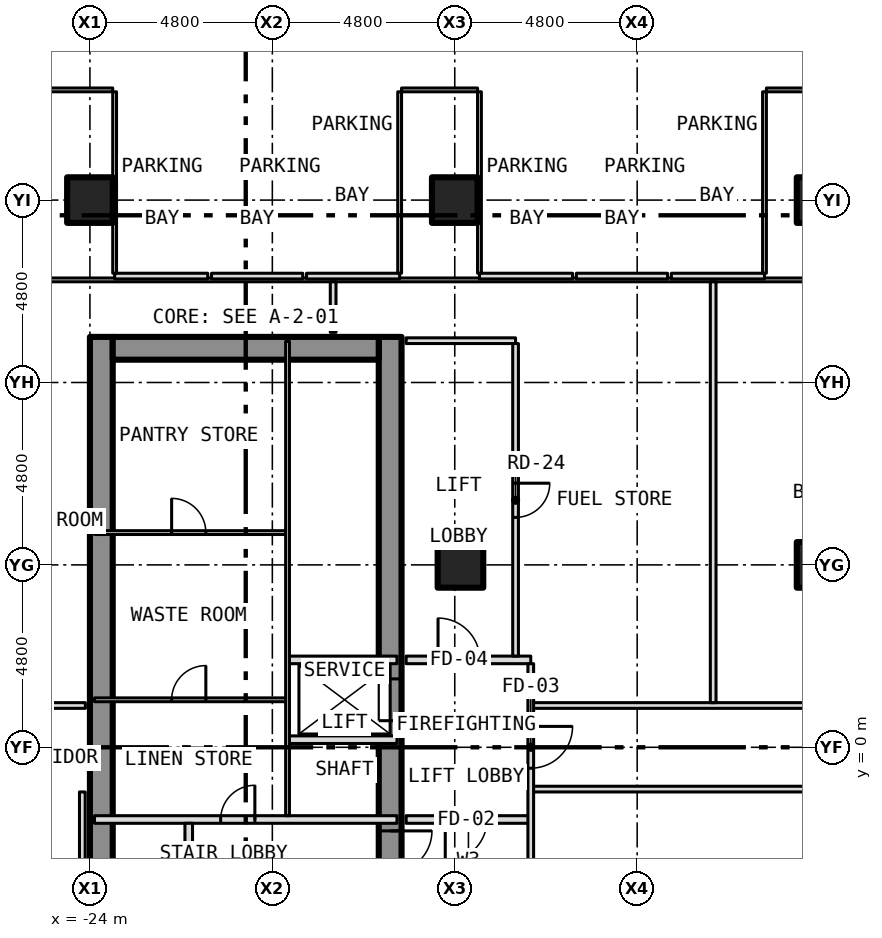
"""IFC4 building model, lengths in metres.
Left out: names, types, materials, properties, quantities, classifications, styles, units other than length and angle.
Written with IfcOpenShell. Run it as: python <this file> out.ifc"""

import sys

from ifc_helpers import new_model, si_unit, direction, frame, frame_2d, origin, origin_2d, place, context, subcontext, project, spatial, rectangle, hollow_rectangle, extrude, element, fill, save


model = new_model("IFC4")
c1 = context("Model", 3, precision=1e-05, world=origin(), true_north=direction((0.0, 1.0)))
c2 = subcontext(c1, "Body", "Model", "MODEL_VIEW")
j1 = project(units=[si_unit("LENGTHUNIT", "METRE"), si_unit("PLANEANGLEUNIT", "RADIAN")], contexts=[c1])
p1 = place(None, origin())
s1 = spatial("IfcSite", under=j1, at=p1, CompositionType="ELEMENT")
p2 = place(p1, origin())
s2 = spatial("IfcBuilding", under=s1, at=p2, CompositionType="ELEMENT")
p3 = place(p2, frame((0.0, 0.0, -10.0)))
s3 = spatial("IfcBuildingStorey", under=s2, at=p3, CompositionType="ELEMENT", Elevation=-10.0)
for number, where, z_axis, x_axis in (
    (1, (-24.0, 14.4, -0.6), (0.0, 0.0, 1.0), (1.0, 0.0, 0.0)),
    (2, (-14.25, 4.8, -0.6), (0.0, 0.0, 1.0), (1.0, 0.0, 0.0)),
    (3, (-14.4, 14.4, -0.6), (0.0, 0.0, 1.0), (1.0, 0.0, 0.0)),
    (4, (-4.8, 4.8, -0.6), (0.0, 0.0, 1.0), (1.0, 0.0, 0.0)),
    (5, (-4.8, 14.4, -0.6), (0.0, 0.0, 1.0), (1.0, 0.0, 0.0)),
):
    element("IfcColumn", number, at=place(p3, frame(where, z_axis=z_axis, x_axis=x_axis)), inside=s3, PredefinedType="COLUMN", context=c2, shape_type="SweptSolid", body=[
        extrude(hollow_rectangle(XDim=1.2, YDim=1.2, WallThickness=0.07, at=origin_2d()), origin(), (0.0, 0.0, 1.0), 5.3),
    ])
p4 = place(p3, frame((-16.1, -10.8, 0.0), z_axis=(0.0, 0.0, 1.0), x_axis=(0.0, 1.0, 0.0)))
e6 = element("IfcWall", 6, at=p4, inside=s3, PredefinedType="SHEAR", context=c2, shape_type="SweptSolid", body=[
    extrude(rectangle(XDim=21.6, YDim=0.6, at=frame_2d((10.8, 0.0))), origin(), (0.0, 0.0, 1.0), 4.7),
])
p5 = place(p4, frame((11.5, 0.0, 0.0)))
e7 = element("IfcOpeningElement", 7, at=p5, cuts=e6, PredefinedType="OPENING", context=c2, shape_type="SweptSolid", body=[
    extrude(rectangle(XDim=1.1, YDim=2.1, at=frame_2d((0.55, 1.05))), frame((0.0, 0.312, 0.0), z_axis=(0.0, -1.0, 0.0), x_axis=(1.0, 0.0, 0.0)), (0.0, 0.0, 1.0), 0.624),
])
p6 = place(p4, frame((0.758, 0.0, 0.0)))
e8 = element("IfcOpeningElement", 8, at=p6, cuts=e6, PredefinedType="OPENING", context=c2, shape_type="SweptSolid", body=[
    extrude(rectangle(XDim=1.1, YDim=2.1, at=frame_2d((0.55, 1.05))), frame((0.0, 0.312, 0.0), z_axis=(0.0, -1.0, 0.0), x_axis=(1.0, 0.0, 0.0)), (0.0, 0.0, 1.0), 0.624),
])
p7 = place(p4, frame((7.5, 0.0, 0.0)))
e9 = element("IfcOpeningElement", 9, at=p7, cuts=e6, PredefinedType="OPENING", context=c2, shape_type="SweptSolid", body=[
    extrude(rectangle(XDim=1.1, YDim=2.1, at=frame_2d((0.55, 1.05))), frame((0.0, 0.312, 0.0), z_axis=(0.0, -1.0, 0.0), x_axis=(1.0, 0.0, 0.0)), (0.0, 0.0, 1.0), 0.624),
])
p8 = place(p3, frame((-23.7, -10.8, 0.0), z_axis=(0.0, 0.0, 1.0), x_axis=(0.0, 1.0, 0.0)))
e10 = element("IfcWall", 10, at=p8, inside=s3, PredefinedType="SHEAR", context=c2, shape_type="SweptSolid", body=[
    extrude(rectangle(XDim=21.6, YDim=0.6, at=frame_2d((10.8, 0.0))), origin(), (0.0, 0.0, 1.0), 4.7),
])
p9 = place(p3, frame((-23.4, 10.5, 0.0), z_axis=(0.0, 0.0, 1.0), x_axis=(1.0, 0.0, 0.0)))
e11 = element("IfcWall", 11, at=p9, inside=s3, PredefinedType="SHEAR", context=c2, shape_type="SweptSolid", body=[
    extrude(rectangle(XDim=7.0, YDim=0.6, at=frame_2d((3.5, 0.0))), origin(), (0.0, 0.0, 1.0), 4.7),
])
p10 = place(p3, frame((-23.88, -1.9, 0.0), z_axis=(0.0, 0.0, 1.0), x_axis=(1.0, 0.0, 0.0)))
e12 = element("IfcWall", 12, at=p10, inside=s3, PredefinedType="PARTITIONING", context=c2, shape_type="SweptSolid", body=[
    extrude(rectangle(XDim=7.96, YDim=0.2, at=frame_2d((3.98, 0.0))), origin(), (0.0, 0.0, 1.0), 4.7),
])
p11 = place(p10, frame((3.32, 0.0, 0.0)))
e13 = element("IfcOpeningElement", 13, at=p11, cuts=e12, PredefinedType="OPENING", context=c2, shape_type="SweptSolid", body=[
    extrude(rectangle(XDim=0.9, YDim=2.1, at=frame_2d((0.45, 1.05))), frame((0.0, 0.112, 0.0), z_axis=(0.0, -1.0, 0.0), x_axis=(1.0, 0.0, 0.0)), (0.0, 0.0, 1.0), 0.224),
])
p12 = place(p3, frame((-15.68, -1.9, 0.0), z_axis=(0.0, 0.0, 1.0), x_axis=(1.0, 0.0, 0.0)))
e14 = element("IfcWall", 14, at=p12, inside=s3, PredefinedType="PARTITIONING", context=c2, shape_type="SweptSolid", body=[
    extrude(rectangle(XDim=3.28, YDim=0.2, at=frame_2d((1.64, 0.0))), origin(), (0.0, 0.0, 1.0), 4.7),
])
p13 = place(p12, frame((1.03, 0.0, 0.0)))
e15 = element("IfcOpeningElement", 15, at=p13, cuts=e14, PredefinedType="OPENING", context=c2, shape_type="SweptSolid", body=[
    extrude(rectangle(XDim=1.1, YDim=2.1, at=frame_2d((0.55, 1.05))), frame((0.0, 0.112, 0.0), z_axis=(0.0, -1.0, 0.0), x_axis=(1.0, 0.0, 0.0)), (0.0, 0.0, 1.0), 0.224),
])
p14 = place(p3, frame((-12.4, -1.1, 0.0), z_axis=(0.0, 0.0, 1.0), x_axis=(1.0, 0.0, 0.0)))
e16 = element("IfcWall", 16, at=p14, inside=s3, PredefinedType="PARTITIONING", context=c2, shape_type="SweptSolid", body=[
    extrude(rectangle(XDim=24.8, YDim=0.15, at=frame_2d((12.4, 0.0))), origin(), (0.0, 0.0, 1.0), 4.7),
])
p15 = place(p3, frame((-18.8, 0.2, 0.0), z_axis=(0.0, 0.0, 1.0), x_axis=(1.0, 0.0, 0.0)))
e17 = element("IfcWall", 17, at=p15, inside=s3, PredefinedType="PARTITIONING", context=c2, shape_type="SweptSolid", body=[
    extrude(rectangle(XDim=2.88, YDim=0.2, at=frame_2d((1.44, 0.0))), origin(), (0.0, 0.0, 1.0), 4.7),
])
p16 = place(p3, frame((-37.6, 1.1, 0.0), z_axis=(0.0, 0.0, 1.0), x_axis=(1.0, 0.0, 0.0)))
e18 = element("IfcWall", 18, at=p16, inside=s3, PredefinedType="PARTITIONING", context=c2, shape_type="SweptSolid", body=[
    extrude(rectangle(XDim=13.48, YDim=0.15, at=frame_2d((6.74, 0.0))), origin(), (0.0, 0.0, 1.0), 4.7),
])
p17 = place(p16, frame((4.55, 0.0, 0.0)))
e19 = element("IfcOpeningElement", 19, at=p17, cuts=e18, PredefinedType="OPENING", context=c2, shape_type="SweptSolid", body=[
    extrude(rectangle(XDim=0.9, YDim=2.1, at=frame_2d((0.45, 1.05))), frame((0.0, 0.087, 0.0), z_axis=(0.0, -1.0, 0.0), x_axis=(1.0, 0.0, 0.0)), (0.0, 0.0, 1.0), 0.174),
])
p18 = place(p16, frame((11.35, 0.0, 0.0)))
e20 = element("IfcOpeningElement", 20, at=p18, cuts=e18, PredefinedType="OPENING", context=c2, shape_type="SweptSolid", body=[
    extrude(rectangle(XDim=0.9, YDim=2.1, at=frame_2d((0.45, 1.05))), frame((0.0, 0.087, 0.0), z_axis=(0.0, -1.0, 0.0), x_axis=(1.0, 0.0, 0.0)), (0.0, 0.0, 1.0), 0.174),
])
p19 = place(p3, frame((-12.4, 1.1, 0.0), z_axis=(0.0, 0.0, 1.0), x_axis=(1.0, 0.0, 0.0)))
e21 = element("IfcWall", 21, at=p19, inside=s3, PredefinedType="PARTITIONING", context=c2, shape_type="SweptSolid", body=[
    extrude(rectangle(XDim=24.8, YDim=0.15, at=frame_2d((12.4, 0.0))), origin(), (0.0, 0.0, 1.0), 4.7),
])
p20 = place(p19, frame((9.35, 0.0, 0.0)))
e22 = element("IfcOpeningElement", 22, at=p20, cuts=e21, PredefinedType="OPENING", context=c2, shape_type="SweptSolid", body=[
    extrude(rectangle(XDim=0.9, YDim=2.1, at=frame_2d((0.45, 1.05))), frame((0.0, 0.087, 0.0), z_axis=(0.0, -1.0, 0.0), x_axis=(1.0, 0.0, 0.0)), (0.0, 0.0, 1.0), 0.174),
])
p21 = place(p19, frame((19.35, 0.0, 0.0)))
e23 = element("IfcOpeningElement", 23, at=p21, cuts=e21, PredefinedType="OPENING", context=c2, shape_type="SweptSolid", body=[
    extrude(rectangle(XDim=0.9, YDim=2.1, at=frame_2d((0.45, 1.05))), frame((0.0, 0.087, 0.0), z_axis=(0.0, -1.0, 0.0), x_axis=(1.0, 0.0, 0.0)), (0.0, 0.0, 1.0), 0.174),
])
p22 = place(p3, frame((-23.88, 1.25, 0.0), z_axis=(0.0, 0.0, 1.0), x_axis=(1.0, 0.0, 0.0)))
e24 = element("IfcWall", 24, at=p22, inside=s3, PredefinedType="PARTITIONING", context=c2, shape_type="SweptSolid", body=[
    extrude(rectangle(XDim=5.08, YDim=0.1, at=frame_2d((2.54, 0.0))), origin(), (0.0, 0.0, 1.0), 4.7),
])
p23 = place(p22, frame((2.03, 0.0, 0.0)))
e25 = element("IfcOpeningElement", 25, at=p23, cuts=e24, PredefinedType="OPENING", context=c2, shape_type="SweptSolid", body=[
    extrude(rectangle(XDim=0.9, YDim=2.1, at=frame_2d((0.45, 1.05))), frame((0.0, 0.062, 0.0), z_axis=(0.0, -1.0, 0.0), x_axis=(1.0, 0.0, 0.0)), (0.0, 0.0, 1.0), 0.124),
])
p24 = place(p3, frame((-18.8, 2.3, 0.0), z_axis=(0.0, 0.0, 1.0), x_axis=(1.0, 0.0, 0.0)))
e26 = element("IfcWall", 26, at=p24, inside=s3, PredefinedType="PARTITIONING", context=c2, shape_type="SweptSolid", body=[
    extrude(rectangle(XDim=2.88, YDim=0.2, at=frame_2d((1.44, 0.0))), origin(), (0.0, 0.0, 1.0), 4.7),
])
p25 = place(p3, frame((-15.68, 2.3, 0.0), z_axis=(0.0, 0.0, 1.0), x_axis=(1.0, 0.0, 0.0)))
e27 = element("IfcWall", 27, at=p25, inside=s3, PredefinedType="PARTITIONING", context=c2, shape_type="SweptSolid", body=[
    extrude(rectangle(XDim=3.28, YDim=0.2, at=frame_2d((1.64, 0.0))), origin(), (0.0, 0.0, 1.0), 4.7),
])
p26 = place(p25, frame((0.84, 0.0, 0.0)))
e28 = element("IfcOpeningElement", 28, at=p26, cuts=e27, PredefinedType="OPENING", context=c2, shape_type="SweptSolid", body=[
    extrude(rectangle(XDim=1.1, YDim=2.1, at=frame_2d((0.55, 1.05))), frame((0.0, 0.112, 0.0), z_axis=(0.0, -1.0, 0.0), x_axis=(1.0, 0.0, 0.0)), (0.0, 0.0, 1.0), 0.224),
])
p27 = place(p3, frame((-23.88, 5.65, 0.0), z_axis=(0.0, 0.0, 1.0), x_axis=(1.0, 0.0, 0.0)))
e29 = element("IfcWall", 29, at=p27, inside=s3, PredefinedType="PARTITIONING", context=c2, shape_type="SweptSolid", body=[
    extrude(rectangle(XDim=5.08, YDim=0.1, at=frame_2d((2.54, 0.0))), origin(), (0.0, 0.0, 1.0), 4.7),
])
p28 = place(p27, frame((2.03, 0.0, 0.0)))
e30 = element("IfcOpeningElement", 30, at=p28, cuts=e29, PredefinedType="OPENING", context=c2, shape_type="SweptSolid", body=[
    extrude(rectangle(XDim=0.9, YDim=2.1, at=frame_2d((0.45, 1.05))), frame((0.0, 0.062, 0.0), z_axis=(0.0, -1.0, 0.0), x_axis=(1.0, 0.0, 0.0)), (0.0, 0.0, 1.0), 0.124),
])
p29 = place(p3, frame((-15.68, 10.7, 0.0), z_axis=(0.0, 0.0, 1.0), x_axis=(1.0, 0.0, 0.0)))
e31 = element("IfcWall", 31, at=p29, inside=s3, PredefinedType="PARTITIONING", context=c2, shape_type="SweptSolid", body=[
    extrude(rectangle(XDim=2.88, YDim=0.15, at=frame_2d((1.44, 0.0))), origin(), (0.0, 0.0, 1.0), 4.7),
])
p30 = place(p3, frame((-37.6, 12.3, 0.0), z_axis=(0.0, 0.0, 1.0), x_axis=(1.0, 0.0, 0.0)))
e32 = element("IfcWall", 32, at=p30, inside=s3, PredefinedType="PARTITIONING", context=c2, shape_type="SweptSolid", body=[
    extrude(rectangle(XDim=70.0, YDim=0.1, at=frame_2d((35.0, 0.0))), origin(), (0.0, 0.0, 1.0), 4.7),
])
p31 = place(p3, frame((-23.35, 12.4, 0.0), z_axis=(0.0, 0.0, 1.0), x_axis=(1.0, 0.0, 0.0)))
e33 = element("IfcWall", 33, at=p31, inside=s3, PredefinedType="PARTITIONING", context=c2, shape_type="SweptSolid", body=[
    extrude(rectangle(XDim=2.45, YDim=0.15, at=frame_2d((1.225, 0.0))), origin(), (0.0, 0.0, 1.0), 4.7),
])
p32 = place(p3, frame((-20.8, 12.4, 0.0), z_axis=(0.0, 0.0, 1.0), x_axis=(1.0, 0.0, 0.0)))
e34 = element("IfcWall", 34, at=p32, inside=s3, PredefinedType="PARTITIONING", context=c2, shape_type="SweptSolid", body=[
    extrude(rectangle(XDim=2.4, YDim=0.15, at=frame_2d((1.2, 0.0))), origin(), (0.0, 0.0, 1.0), 4.7),
])
for number, where, z_axis, x_axis in (
    (35, (-18.3, 12.4, 0.0), (0.0, 0.0, 1.0), (1.0, 0.0, 0.0)),
    (36, (-13.75, 12.4, 0.0), (0.0, 0.0, 1.0), (1.0, 0.0, 0.0)),
):
    element("IfcWall", number, at=place(p3, frame(where, z_axis=z_axis, x_axis=x_axis)), inside=s3, PredefinedType="PARTITIONING", context=c2, shape_type="SweptSolid", body=[
        extrude(rectangle(XDim=2.45, YDim=0.15, at=frame_2d((1.225, 0.0))), origin(), (0.0, 0.0, 1.0), 4.7),
    ])
p33 = place(p3, frame((-11.2, 12.4, 0.0), z_axis=(0.0, 0.0, 1.0), x_axis=(1.0, 0.0, 0.0)))
e37 = element("IfcWall", 37, at=p33, inside=s3, PredefinedType="PARTITIONING", context=c2, shape_type="SweptSolid", body=[
    extrude(rectangle(XDim=2.4, YDim=0.15, at=frame_2d((1.2, 0.0))), origin(), (0.0, 0.0, 1.0), 4.7),
])
p34 = place(p3, frame((-8.7, 12.4, 0.0), z_axis=(0.0, 0.0, 1.0), x_axis=(1.0, 0.0, 0.0)))
e38 = element("IfcWall", 38, at=p34, inside=s3, PredefinedType="PARTITIONING", context=c2, shape_type="SweptSolid", body=[
    extrude(rectangle(XDim=2.45, YDim=0.15, at=frame_2d((1.225, 0.0))), origin(), (0.0, 0.0, 1.0), 4.7),
])
for number, where, z_axis, x_axis in (
    (39, (-25.4, 17.3, 0.0), (0.0, 0.0, 1.0), (1.0, 0.0, 0.0)),
    (40, (-15.8, 17.3, 0.0), (0.0, 0.0, 1.0), (1.0, 0.0, 0.0)),
    (41, (-6.2, 17.3, 0.0), (0.0, 0.0, 1.0), (1.0, 0.0, 0.0)),
):
    element("IfcWall", number, at=place(p3, frame(where, z_axis=z_axis, x_axis=x_axis)), inside=s3, PredefinedType="PARTITIONING", context=c2, shape_type="SweptSolid", body=[
        extrude(rectangle(XDim=2.0, YDim=0.1, at=frame_2d((1.0, 0.0))), origin(), (0.0, 0.0, 1.0), 4.7),
    ])
p35 = place(p3, frame((-24.2, -10.725, 0.0), z_axis=(0.0, 0.0, 1.0), x_axis=(0.0, 1.0, 0.0)))
e42 = element("IfcWall", 42, at=p35, inside=s3, PredefinedType="PARTITIONING", context=c2, shape_type="SweptSolid", body=[
    extrude(rectangle(XDim=9.55, YDim=0.15, at=frame_2d((4.775, 0.0))), origin(), (0.0, 0.0, 1.0), 4.7),
])
p36 = place(p3, frame((-23.35, 12.475, 0.0), z_axis=(0.0, 0.0, 1.0), x_axis=(0.0, 1.0, 0.0)))
e43 = element("IfcWall", 43, at=p36, inside=s3, PredefinedType="PARTITIONING", context=c2, shape_type="SweptSolid", body=[
    extrude(rectangle(XDim=4.775, YDim=0.1, at=frame_2d((2.387, 0.0))), origin(), (0.0, 0.0, 1.0), 4.7),
])
p37 = place(p3, frame((-21.4, -10.68, 0.0), z_axis=(0.0, 0.0, 1.0), x_axis=(0.0, 1.0, 0.0)))
e44 = element("IfcWall", 44, at=p37, inside=s3, PredefinedType="PARTITIONING", context=c2, shape_type="SweptSolid", body=[
    extrude(rectangle(XDim=8.68, YDim=0.2, at=frame_2d((4.34, 0.0))), origin(), (0.0, 0.0, 1.0), 4.7),
])
p38 = place(p37, frame((2.1, 0.0, 0.0)))
e45 = element("IfcOpeningElement", 45, at=p38, cuts=e44, PredefinedType="OPENING", context=c2, shape_type="SweptSolid", body=[
    extrude(rectangle(XDim=0.9, YDim=2.1, at=frame_2d((0.45, 1.05))), frame((0.0, 0.112, 0.0), z_axis=(0.0, -1.0, 0.0), x_axis=(1.0, 0.0, 0.0)), (0.0, 0.0, 1.0), 0.224),
])
p39 = place(p37, frame((6.55, 0.0, 0.0)))
e46 = element("IfcOpeningElement", 46, at=p39, cuts=e44, PredefinedType="OPENING", context=c2, shape_type="SweptSolid", body=[
    extrude(rectangle(XDim=0.9, YDim=2.1, at=frame_2d((0.45, 1.05))), frame((0.0, 0.112, 0.0), z_axis=(0.0, -1.0, 0.0), x_axis=(1.0, 0.0, 0.0)), (0.0, 0.0, 1.0), 0.224),
])
p40 = place(p3, frame((-18.8, -1.8, 0.0), z_axis=(0.0, 0.0, 1.0), x_axis=(0.0, 1.0, 0.0)))
e47 = element("IfcWall", 47, at=p40, inside=s3, PredefinedType="PARTITIONING", context=c2, shape_type="SweptSolid", body=[
    extrude(rectangle(XDim=12.48, YDim=0.1, at=frame_2d((6.24, 0.0))), origin(), (0.0, 0.0, 1.0), 4.7),
])
p41 = place(p3, frame((-17.6, 10.92, 0.0), z_axis=(0.0, 0.0, 1.0), x_axis=(0.0, 1.0, 0.0)))
e48 = element("IfcWall", 48, at=p41, inside=s3, PredefinedType="PARTITIONING", context=c2, shape_type="SweptSolid", body=[
    extrude(rectangle(XDim=1.33, YDim=0.15, at=frame_2d((0.665, 0.0))), origin(), (0.0, 0.0, 1.0), 4.7),
])
for number, where, z_axis, x_axis in (
    (49, (-15.85, 12.475, 0.0), (0.0, 0.0, 1.0), (0.0, 1.0, 0.0)),
    (50, (-13.75, 12.475, 0.0), (0.0, 0.0, 1.0), (0.0, 1.0, 0.0)),
):
    element("IfcWall", number, at=place(p3, frame(where, z_axis=z_axis, x_axis=x_axis)), inside=s3, PredefinedType="PARTITIONING", context=c2, shape_type="SweptSolid", body=[
        extrude(rectangle(XDim=4.775, YDim=0.1, at=frame_2d((2.387, 0.0))), origin(), (0.0, 0.0, 1.0), 4.7),
    ])
p42 = place(p3, frame((-12.8, 2.4, 0.0), z_axis=(0.0, 0.0, 1.0), x_axis=(0.0, 1.0, 0.0)))
e51 = element("IfcWall", 51, at=p42, inside=s3, PredefinedType="PARTITIONING", context=c2, shape_type="SweptSolid", body=[
    extrude(rectangle(XDim=8.225, YDim=0.15, at=frame_2d((4.113, 0.0))), origin(), (0.0, 0.0, 1.0), 4.7),
])
p43 = place(p42, frame((3.65, 0.0, 0.0)))
e52 = element("IfcOpeningElement", 52, at=p43, cuts=e51, PredefinedType="OPENING", context=c2, shape_type="SweptSolid", body=[
    extrude(rectangle(XDim=0.9, YDim=2.1, at=frame_2d((0.45, 1.05))), frame((0.0, 0.087, 0.0), z_axis=(0.0, -1.0, 0.0), x_axis=(1.0, 0.0, 0.0)), (0.0, 0.0, 1.0), 0.174),
])
p44 = place(p3, frame((-12.4, -10.725, 0.0), z_axis=(0.0, 0.0, 1.0), x_axis=(0.0, 1.0, 0.0)))
e53 = element("IfcWall", 53, at=p44, inside=s3, PredefinedType="PARTITIONING", context=c2, shape_type="SweptSolid", body=[
    extrude(rectangle(XDim=12.925, YDim=0.15, at=frame_2d((6.462, 0.0))), origin(), (0.0, 0.0, 1.0), 4.7),
])
p45 = place(p44, frame((10.175, 0.0, 0.0)))
e54 = element("IfcOpeningElement", 54, at=p45, cuts=e53, PredefinedType="OPENING", context=c2, shape_type="SweptSolid", body=[
    extrude(rectangle(XDim=1.1, YDim=2.1, at=frame_2d((0.55, 1.05))), frame((0.0, 0.087, 0.0), z_axis=(0.0, -1.0, 0.0), x_axis=(1.0, 0.0, 0.0)), (0.0, 0.0, 1.0), 0.174),
])
p46 = place(p3, frame((-7.6, 1.175, 0.0), z_axis=(0.0, 0.0, 1.0), x_axis=(0.0, 1.0, 0.0)))
e55 = element("IfcWall", 55, at=p46, inside=s3, PredefinedType="PARTITIONING", context=c2, shape_type="SweptSolid", body=[
    extrude(rectangle(XDim=11.075, YDim=0.15, at=frame_2d((5.538, 0.0))), origin(), (0.0, 0.0, 1.0), 4.7),
])
p47 = place(p3, frame((-6.25, 12.475, 0.0), z_axis=(0.0, 0.0, 1.0), x_axis=(0.0, 1.0, 0.0)))
e56 = element("IfcWall", 56, at=p47, inside=s3, PredefinedType="PARTITIONING", context=c2, shape_type="SweptSolid", body=[
    extrude(rectangle(XDim=4.775, YDim=0.1, at=frame_2d((2.387, 0.0))), origin(), (0.0, 0.0, 1.0), 4.7),
])
p48 = place(p5, origin())
e57 = element("IfcDoor", 57, at=p48, inside=s3, OperationType="SLIDING_TO_LEFT", PredefinedType="DOOR", context=c2, shape_type="SweptSolid", body=[
    extrude(rectangle(XDim=1.1, YDim=2.1, at=frame_2d((0.55, 1.05))), frame((0.0, 0.025, 0.0), z_axis=(0.0, -1.0, 0.0), x_axis=(1.0, 0.0, 0.0)), (0.0, 0.0, 1.0), 0.05),
])
fill(e7, e57)
p49 = place(p7, origin())
e58 = element("IfcDoor", 58, at=p49, inside=s3, OperationType="SINGLE_SWING_RIGHT", PredefinedType="DOOR", context=c2, shape_type="SweptSolid", body=[
    extrude(rectangle(XDim=1.1, YDim=2.1, at=frame_2d((0.55, 1.05))), frame((0.0, 0.025, 0.0), z_axis=(0.0, -1.0, 0.0), x_axis=(1.0, 0.0, 0.0)), (0.0, 0.0, 1.0), 0.05),
])
fill(e9, e58)
p50 = place(p11, origin())
e59 = element("IfcDoor", 59, at=p50, inside=s3, OperationType="SINGLE_SWING_RIGHT", PredefinedType="DOOR", context=c2, shape_type="SweptSolid", body=[
    extrude(rectangle(XDim=0.9, YDim=2.1, at=frame_2d((0.45, 1.05))), frame((0.0, 0.025, 0.0), z_axis=(0.0, -1.0, 0.0), x_axis=(1.0, 0.0, 0.0)), (0.0, 0.0, 1.0), 0.05),
])
fill(e13, e59)
p51 = place(p23, origin())
e60 = element("IfcDoor", 60, at=p51, inside=s3, OperationType="SINGLE_SWING_RIGHT", PredefinedType="DOOR", context=c2, shape_type="SweptSolid", body=[
    extrude(rectangle(XDim=0.9, YDim=2.1, at=frame_2d((0.45, 1.05))), frame((0.0, 0.025, 0.0), z_axis=(0.0, -1.0, 0.0), x_axis=(1.0, 0.0, 0.0)), (0.0, 0.0, 1.0), 0.05),
])
fill(e25, e60)
p52 = place(p28, origin())
e61 = element("IfcDoor", 61, at=p52, inside=s3, OperationType="SINGLE_SWING_LEFT", PredefinedType="DOOR", context=c2, shape_type="SweptSolid", body=[
    extrude(rectangle(XDim=0.9, YDim=2.1, at=frame_2d((0.45, 1.05))), frame((0.0, 0.025, 0.0), z_axis=(0.0, -1.0, 0.0), x_axis=(1.0, 0.0, 0.0)), (0.0, 0.0, 1.0), 0.05),
])
fill(e30, e61)
p53 = place(p13, origin())
e62 = element("IfcDoor", 62, at=p53, inside=s3, OperationType="SINGLE_SWING_LEFT", PredefinedType="DOOR", context=c2, shape_type="SweptSolid", body=[
    extrude(rectangle(XDim=1.1, YDim=2.1, at=frame_2d((0.55, 1.05))), frame((0.0, 0.025, 0.0), z_axis=(0.0, -1.0, 0.0), x_axis=(1.0, 0.0, 0.0)), (0.0, 0.0, 1.0), 0.05),
])
fill(e15, e62)
p54 = place(p45, origin())
e63 = element("IfcDoor", 63, at=p54, inside=s3, OperationType="SINGLE_SWING_RIGHT", PredefinedType="DOOR", context=c2, shape_type="SweptSolid", body=[
    extrude(rectangle(XDim=1.1, YDim=2.1, at=frame_2d((0.55, 1.05))), frame((0.0, 0.025, 0.0), z_axis=(0.0, -1.0, 0.0), x_axis=(1.0, 0.0, 0.0)), (0.0, 0.0, 1.0), 0.05),
])
fill(e54, e63)
p55 = place(p26, origin())
e64 = element("IfcDoor", 64, at=p55, inside=s3, OperationType="SINGLE_SWING_LEFT", PredefinedType="DOOR", context=c2, shape_type="SweptSolid", body=[
    extrude(rectangle(XDim=1.1, YDim=2.1, at=frame_2d((0.55, 1.05))), frame((0.0, 0.025, 0.0), z_axis=(0.0, -1.0, 0.0), x_axis=(1.0, 0.0, 0.0)), (0.0, 0.0, 1.0), 0.05),
])
fill(e28, e64)
p56 = place(p43, origin())
e65 = element("IfcDoor", 65, at=p56, inside=s3, OperationType="SINGLE_SWING_RIGHT", PredefinedType="DOOR", context=c2, shape_type="SweptSolid", body=[
    extrude(rectangle(XDim=0.9, YDim=2.1, at=frame_2d((0.45, 1.05))), frame((0.0, 0.025, 0.0), z_axis=(0.0, -1.0, 0.0), x_axis=(1.0, 0.0, 0.0)), (0.0, 0.0, 1.0), 0.05),
])
fill(e52, e65)
save(model, sys.argv[1])
